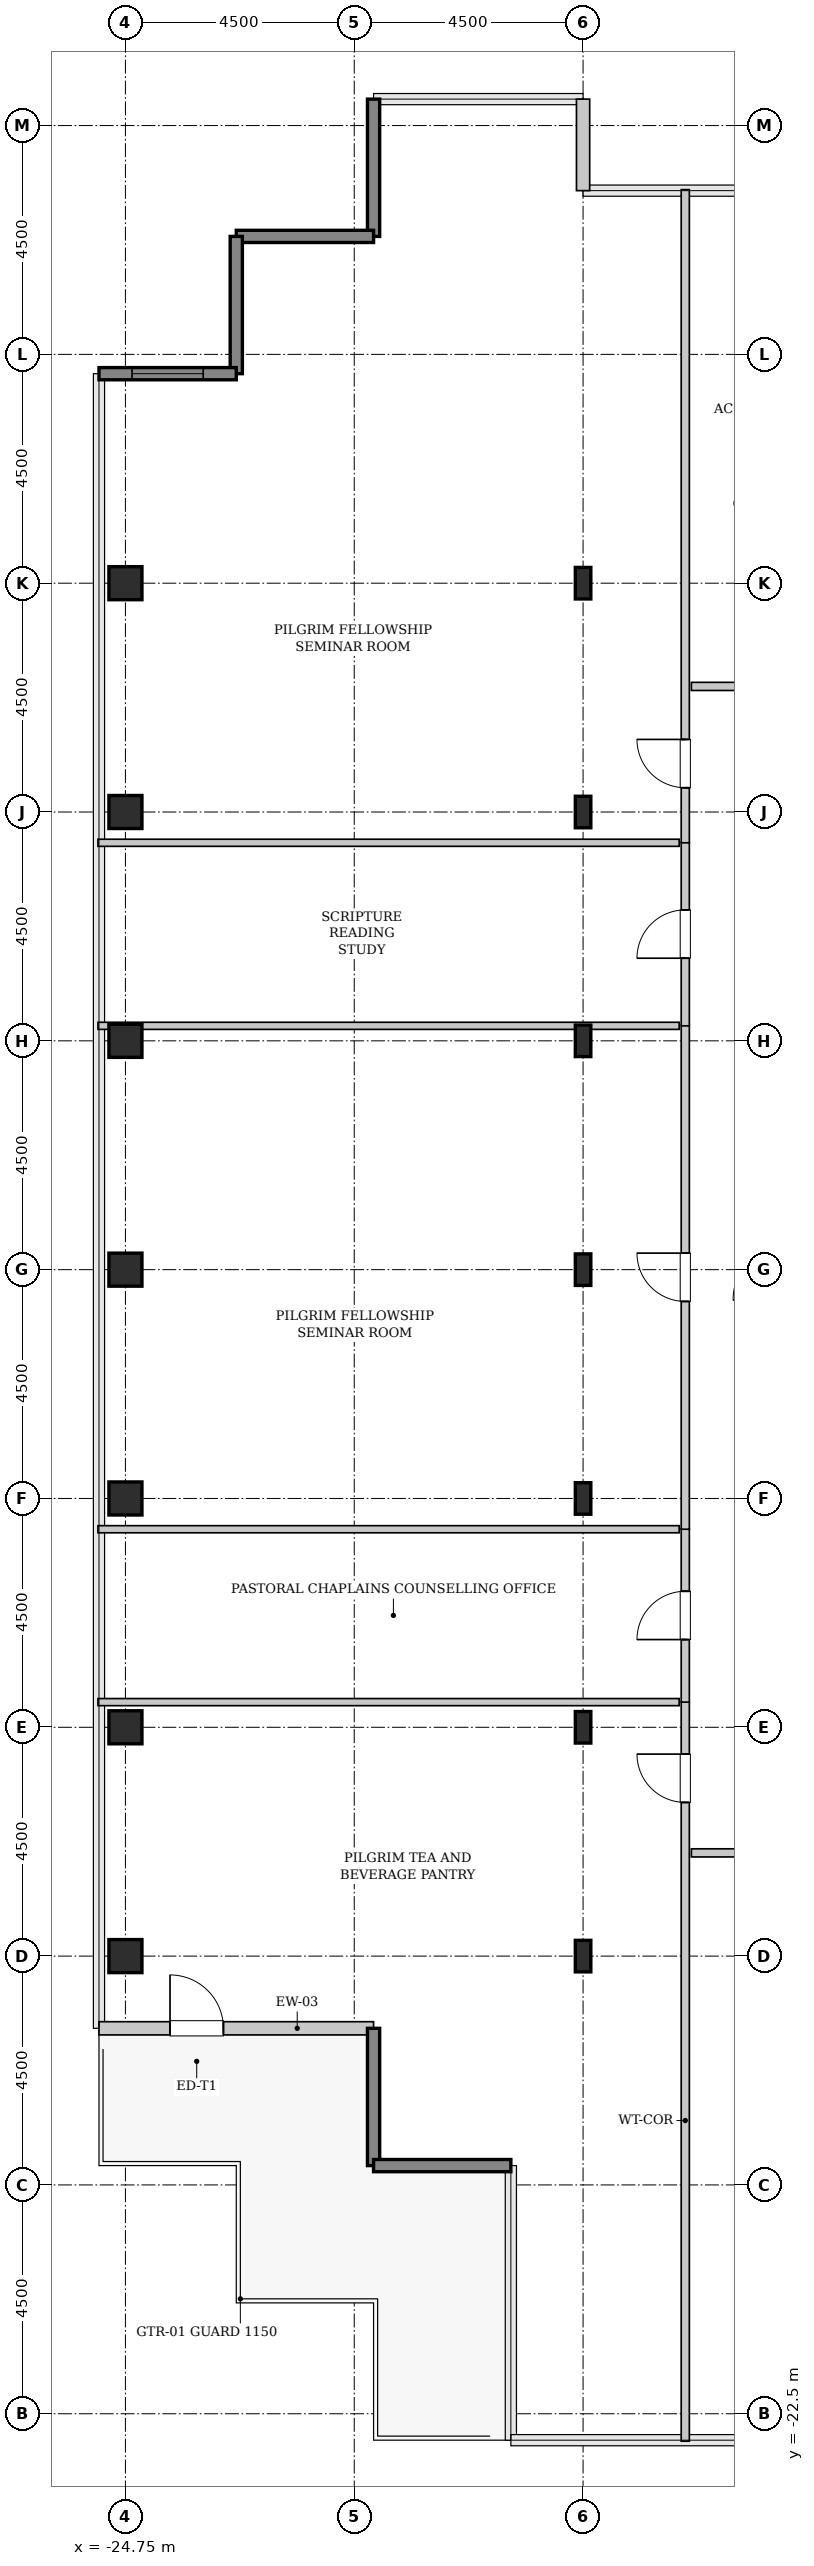
"""IFC4 building model, lengths in metres.
Left out: names, types, materials, properties, quantities, classifications, styles, units other than length and angle.
Written with IfcOpenShell. Run it as: python <this file> out.ifc"""

import sys

from ifc_helpers import new_model, si_unit, direction, frame, frame_2d, origin, origin_2d, place, context, subcontext, project, spatial, rectangle, hollow_rectangle, i_section, extrude, source, transform, mapped, element, fill, save


model = new_model("IFC4")
c1 = context("Model", 3, precision=1e-05, world=origin(), true_north=direction((0.0, 1.0)))
c2 = subcontext(c1, "Body", "Model", "MODEL_VIEW")
j1 = project(units=[si_unit("LENGTHUNIT", "METRE"), si_unit("PLANEANGLEUNIT", "RADIAN")], contexts=[c1])
p1 = place(None, origin())
s1 = spatial("IfcSite", under=j1, at=p1, CompositionType="ELEMENT")
p2 = place(p1, origin())
s2 = spatial("IfcBuilding", under=s1, at=p2, CompositionType="ELEMENT")
p3 = place(p2, frame((0.0, 0.0, 279.8)))
s3 = spatial("IfcBuildingStorey", under=s2, at=p3, CompositionType="ELEMENT", Elevation=279.8)
m1 = source(origin(), c2, "Body", "SweptSolid", [
    extrude(hollow_rectangle(XDim=0.65, YDim=0.65, WallThickness=0.032, InnerFilletRadius=0.032, OuterFilletRadius=0.064, at=origin_2d()), origin(), (0.0, 0.0, 1.0), 3.8),
])
for number, where, z_axis, x_axis in (
    (1, (-24.75, -13.5, 0.0), (0.0, 0.0, 1.0), (1.0, 0.0, 0.0)),
    (2, (-24.75, -9.0, 0.0), (0.0, 0.0, 1.0), (1.0, 0.0, 0.0)),
    (3, (-24.75, -4.5, 0.0), (0.0, 0.0, 1.0), (1.0, 0.0, 0.0)),
    (4, (-24.75, 0.0, 0.0), (0.0, 0.0, 1.0), (1.0, 0.0, 0.0)),
    (5, (-24.75, 4.5, 0.0), (0.0, 0.0, 1.0), (1.0, 0.0, 0.0)),
    (6, (-24.75, 9.0, 0.0), (0.0, 0.0, 1.0), (1.0, 0.0, 0.0)),
    (7, (-24.75, 13.5, 0.0), (0.0, 0.0, 1.0), (1.0, 0.0, 0.0)),
):
    element("IfcColumn", number, at=place(p3, frame(where, z_axis=z_axis, x_axis=x_axis)), inside=s3, PredefinedType="COLUMN", context=c2, shape_type="MappedRepresentation", body=[
        mapped(m1, transform((0.0, 0.0, 0.0), x_axis=(1.0, 0.0, 0.0), y_axis=(0.0, 1.0, 0.0), z_axis=(0.0, 0.0, 1.0), scale=1.0)),
    ])
m2 = source(origin(), c2, "Body", "SweptSolid", [
    extrude(i_section(OverallWidth=0.305, OverallDepth=0.62, WebThickness=0.021, FlangeThickness=0.04, FilletRadius=0.027, at=origin_2d()), origin(), (0.0, 0.0, 1.0), 3.8),
])
for number, where, z_axis, x_axis in (
    (8, (-15.75, -13.5, 0.0), (0.0, 0.0, 1.0), (1.0, 0.0, 0.0)),
    (9, (-15.75, -9.0, 0.0), (0.0, 0.0, 1.0), (1.0, 0.0, 0.0)),
    (10, (-15.75, -4.5, 0.0), (0.0, 0.0, 1.0), (1.0, 0.0, 0.0)),
    (11, (-15.75, 0.0, 0.0), (0.0, 0.0, 1.0), (1.0, 0.0, 0.0)),
    (12, (-15.75, 4.5, 0.0), (0.0, 0.0, 1.0), (1.0, 0.0, 0.0)),
    (13, (-15.75, 9.0, 0.0), (0.0, 0.0, 1.0), (1.0, 0.0, 0.0)),
    (14, (-15.75, 13.5, 0.0), (0.0, 0.0, 1.0), (1.0, 0.0, 0.0)),
):
    element("IfcColumn", number, at=place(p3, frame(where, z_axis=z_axis, x_axis=x_axis)), inside=s3, PredefinedType="COLUMN", context=c2, shape_type="MappedRepresentation", body=[
        mapped(m2, transform((0.0, 0.0, 0.0), x_axis=(1.0, 0.0, 0.0), y_axis=(0.0, 1.0, 0.0), z_axis=(0.0, 0.0, 1.0), scale=1.0)),
    ])
m3 = source(origin(), c2, "Body", "SweptSolid", [
    extrude(rectangle(XDim=1.8, YDim=0.26, at=frame_2d((0.9, 0.0))), origin(), (0.0, 0.0, 1.0), 3.55),
])
p4 = place(p3, frame((-15.75, 21.22, 0.0), z_axis=(0.0, 0.0, 1.0), x_axis=(0.0, 1.0, 0.0)))
e15 = element("IfcWall", 15, at=p4, inside=s3, PredefinedType="SOLIDWALL", context=c2, shape_type="MappedRepresentation", body=[
    mapped(m3, transform((0.0, 0.0, 0.0), x_axis=(1.0, 0.0, 0.0), y_axis=(0.0, 1.0, 0.0), z_axis=(0.0, 0.0, 1.0), scale=1.0)),
])
m4 = source(origin(), c2, "Body", "SweptSolid", [
    extrude(rectangle(XDim=2.7, YDim=0.24, at=frame_2d((1.35, 0.0))), origin(), (0.0, 0.0, 1.0), 3.55),
])
for number, where, z_axis, x_axis in (
    (16, (-19.87, 23.02, 0.0), (0.0, 0.0, 1.0), (0.0, -1.0, 0.0)),
    (17, (-19.87, 20.32, 0.0), (0.0, 0.0, 1.0), (-1.0, 0.0, 0.0)),
    (18, (-22.57, 20.32, 0.0), (0.0, 0.0, 1.0), (0.0, -1.0, 0.0)),
):
    element("IfcWall", number, at=place(p3, frame(where, z_axis=z_axis, x_axis=x_axis)), inside=s3, PredefinedType="SHEAR", context=c2, shape_type="MappedRepresentation", body=[
        mapped(m4, transform((0.0, 0.0, 0.0), x_axis=(1.0, 0.0, 0.0), y_axis=(0.0, 1.0, 0.0), z_axis=(0.0, 0.0, 1.0), scale=1.0)),
    ])
p5 = place(p3, frame((-22.57, 17.62, 0.0), z_axis=(0.0, 0.0, 1.0), x_axis=(-1.0, 0.0, 0.0)))
e19 = element("IfcWall", 19, at=p5, inside=s3, PredefinedType="SHEAR", context=c2, shape_type="MappedRepresentation", body=[
    mapped(m4, transform((0.0, 0.0, 0.0), x_axis=(1.0, 0.0, 0.0), y_axis=(0.0, 1.0, 0.0), z_axis=(0.0, 0.0, 1.0), scale=1.0)),
])
p6 = place(p5, frame((0.65, 0.0, 0.85)))
e20 = element("IfcOpeningElement", 20, at=p6, cuts=e19, PredefinedType="OPENING", context=c2, shape_type="SweptSolid", body=[
    extrude(rectangle(XDim=1.4, YDim=1.8, at=frame_2d((0.7, 0.9))), frame((0.0, 0.13, 0.0), z_axis=(0.0, -1.0, 0.0), x_axis=(1.0, 0.0, 0.0)), (0.0, 0.0, 1.0), 0.26),
])
m5 = source(origin(), c2, "Body", "SweptSolid", [
    extrude(rectangle(XDim=5.4, YDim=0.26, at=frame_2d((2.7, 0.0))), origin(), (0.0, 0.0, 1.0), 3.55),
])
p7 = place(p3, frame((-25.27, -14.92, 0.0), z_axis=(0.0, 0.0, 1.0), x_axis=(1.0, 0.0, 0.0)))
e21 = element("IfcWall", 21, at=p7, inside=s3, PredefinedType="SOLIDWALL", context=c2, shape_type="MappedRepresentation", body=[
    mapped(m5, transform((0.0, 0.0, 0.0), x_axis=(1.0, 0.0, 0.0), y_axis=(0.0, 1.0, 0.0), z_axis=(0.0, 0.0, 1.0), scale=1.0)),
])
p8 = place(p7, frame((1.397, 0.0, 0.0)))
e22 = element("IfcOpeningElement", 22, at=p8, cuts=e21, PredefinedType="OPENING", context=c2, shape_type="SweptSolid", body=[
    extrude(rectangle(XDim=1.05, YDim=2.2, at=frame_2d((0.525, 1.1))), frame((0.0, 0.14, 0.0), z_axis=(0.0, -1.0, 0.0), x_axis=(1.0, 0.0, 0.0)), (0.0, 0.0, 1.0), 0.28),
])
m6 = source(origin(), c2, "Body", "SweptSolid", [
    extrude(rectangle(XDim=2.7, YDim=0.24, at=frame_2d((1.35, 0.0))), origin(), (0.0, 0.0, 1.0), 3.55),
])
for number, where, z_axis, x_axis in (
    (23, (-19.87, -14.92, 0.0), (0.0, 0.0, 1.0), (0.0, -1.0, 0.0)),
    (24, (-19.87, -17.62, 0.0), (0.0, 0.0, 1.0), (1.0, 0.0, 0.0)),
):
    element("IfcWall", number, at=place(p3, frame(where, z_axis=z_axis, x_axis=x_axis)), inside=s3, PredefinedType="SHEAR", context=c2, shape_type="MappedRepresentation", body=[
        mapped(m6, transform((0.0, 0.0, 0.0), x_axis=(1.0, 0.0, 0.0), y_axis=(0.0, 1.0, 0.0), z_axis=(0.0, 0.0, 1.0), scale=1.0)),
    ])
m7 = source(origin(), c2, "Body", "SweptSolid", [
    extrude(rectangle(XDim=14.545, YDim=0.16, at=frame_2d((7.272, 0.0))), origin(), (0.0, 0.0, 1.0), 3.535),
])
p9 = place(p3, frame((-13.74, -23.04, 0.0), z_axis=(0.0, 0.0, 1.0), x_axis=(0.0, 1.0, 0.0)))
e25 = element("IfcWall", 25, at=p9, inside=s3, PredefinedType="PARTITIONING", context=c2, shape_type="MappedRepresentation", body=[
    mapped(m7, transform((0.0, 0.0, 0.0), x_axis=(1.0, 0.0, 0.0), y_axis=(0.0, 1.0, 0.0), z_axis=(0.0, 0.0, 1.0), scale=1.0)),
])
p10 = place(p9, frame((12.562, 0.0, 0.0)))
e26 = element("IfcOpeningElement", 26, at=p10, cuts=e25, PredefinedType="OPENING", context=c2, shape_type="SweptSolid", body=[
    extrude(rectangle(XDim=0.95, YDim=2.1, at=frame_2d((0.475, 1.05))), frame((0.0, 0.09, 0.0), z_axis=(0.0, -1.0, 0.0), x_axis=(1.0, 0.0, 0.0)), (0.0, 0.0, 1.0), 0.18),
])
m8 = source(origin(), c2, "Body", "SweptSolid", [
    extrude(rectangle(XDim=11.43, YDim=0.14, at=frame_2d((5.715, 0.0))), origin(), (0.0, 0.0, 1.0), 2.925),
])
p11 = place(p3, frame((-25.29, -8.505, 0.0), z_axis=(0.0, 0.0, 1.0), x_axis=(1.0, 0.0, 0.0)))
e27 = element("IfcWall", 27, at=p11, inside=s3, PredefinedType="PARTITIONING", context=c2, shape_type="MappedRepresentation", body=[
    mapped(m8, transform((0.0, 0.0, 0.0), x_axis=(1.0, 0.0, 0.0), y_axis=(0.0, 1.0, 0.0), z_axis=(0.0, 0.0, 1.0), scale=1.0)),
])
m9 = source(origin(), c2, "Body", "SweptSolid", [
    extrude(rectangle(XDim=3.41, YDim=0.16, at=frame_2d((1.705, 0.0))), origin(), (0.0, 0.0, 1.0), 3.535),
])
p12 = place(p3, frame((-13.74, -8.505, 0.0), z_axis=(0.0, 0.0, 1.0), x_axis=(0.0, 1.0, 0.0)))
e28 = element("IfcWall", 28, at=p12, inside=s3, PredefinedType="PARTITIONING", context=c2, shape_type="MappedRepresentation", body=[
    mapped(m9, transform((0.0, 0.0, 0.0), x_axis=(1.0, 0.0, 0.0), y_axis=(0.0, 1.0, 0.0), z_axis=(0.0, 0.0, 1.0), scale=1.0)),
])
p13 = place(p12, frame((1.23, 0.0, 0.0)))
e29 = element("IfcOpeningElement", 29, at=p13, cuts=e28, PredefinedType="OPENING", context=c2, shape_type="SweptSolid", body=[
    extrude(rectangle(XDim=0.95, YDim=2.1, at=frame_2d((0.475, 1.05))), frame((0.0, 0.09, 0.0), z_axis=(0.0, -1.0, 0.0), x_axis=(1.0, 0.0, 0.0)), (0.0, 0.0, 1.0), 0.18),
])
m10 = source(origin(), c2, "Body", "SweptSolid", [
    extrude(rectangle(XDim=11.43, YDim=0.14, at=frame_2d((5.715, 0.0))), origin(), (0.0, 0.0, 1.0), 3.535),
])
p14 = place(p3, frame((-25.29, -5.105, 0.0), z_axis=(0.0, 0.0, 1.0), x_axis=(1.0, 0.0, 0.0)))
e30 = element("IfcWall", 30, at=p14, inside=s3, PredefinedType="PARTITIONING", context=c2, shape_type="MappedRepresentation", body=[
    mapped(m10, transform((0.0, 0.0, 0.0), x_axis=(1.0, 0.0, 0.0), y_axis=(0.0, 1.0, 0.0), z_axis=(0.0, 0.0, 1.0), scale=1.0)),
])
m11 = source(origin(), c2, "Body", "SweptSolid", [
    extrude(rectangle(XDim=9.91, YDim=0.16, at=frame_2d((4.955, 0.0))), origin(), (0.0, 0.0, 1.0), 3.535),
])
p15 = place(p3, frame((-13.74, -5.105, 0.0), z_axis=(0.0, 0.0, 1.0), x_axis=(0.0, 1.0, 0.0)))
e31 = element("IfcWall", 31, at=p15, inside=s3, PredefinedType="PARTITIONING", context=c2, shape_type="MappedRepresentation", body=[
    mapped(m11, transform((0.0, 0.0, 0.0), x_axis=(1.0, 0.0, 0.0), y_axis=(0.0, 1.0, 0.0), z_axis=(0.0, 0.0, 1.0), scale=1.0)),
])
p16 = place(p15, frame((4.48, 0.0, 0.0)))
e32 = element("IfcOpeningElement", 32, at=p16, cuts=e31, PredefinedType="OPENING", context=c2, shape_type="SweptSolid", body=[
    extrude(rectangle(XDim=0.95, YDim=2.1, at=frame_2d((0.475, 1.05))), frame((0.0, 0.09, 0.0), z_axis=(0.0, -1.0, 0.0), x_axis=(1.0, 0.0, 0.0)), (0.0, 0.0, 1.0), 0.18),
])
p17 = place(p3, frame((-25.29, 4.795, 0.0), z_axis=(0.0, 0.0, 1.0), x_axis=(1.0, 0.0, 0.0)))
e33 = element("IfcWall", 33, at=p17, inside=s3, PredefinedType="PARTITIONING", context=c2, shape_type="MappedRepresentation", body=[
    mapped(m8, transform((0.0, 0.0, 0.0), x_axis=(1.0, 0.0, 0.0), y_axis=(0.0, 1.0, 0.0), z_axis=(0.0, 0.0, 1.0), scale=1.0)),
])
m12 = source(origin(), c2, "Body", "SweptSolid", [
    extrude(rectangle(XDim=3.61, YDim=0.16, at=frame_2d((1.805, 0.0))), origin(), (0.0, 0.0, 1.0), 3.535),
])
p18 = place(p3, frame((-13.74, 4.795, 0.0), z_axis=(0.0, 0.0, 1.0), x_axis=(0.0, 1.0, 0.0)))
e34 = element("IfcWall", 34, at=p18, inside=s3, PredefinedType="PARTITIONING", context=c2, shape_type="MappedRepresentation", body=[
    mapped(m12, transform((0.0, 0.0, 0.0), x_axis=(1.0, 0.0, 0.0), y_axis=(0.0, 1.0, 0.0), z_axis=(0.0, 0.0, 1.0), scale=1.0)),
])
p19 = place(p18, frame((1.33, 0.0, 0.0)))
e35 = element("IfcOpeningElement", 35, at=p19, cuts=e34, PredefinedType="OPENING", context=c2, shape_type="SweptSolid", body=[
    extrude(rectangle(XDim=0.95, YDim=2.1, at=frame_2d((0.475, 1.05))), frame((0.0, 0.09, 0.0), z_axis=(0.0, -1.0, 0.0), x_axis=(1.0, 0.0, 0.0)), (0.0, 0.0, 1.0), 0.18),
])
p20 = place(p3, frame((-25.29, 8.395, 0.0), z_axis=(0.0, 0.0, 1.0), x_axis=(1.0, 0.0, 0.0)))
e36 = element("IfcWall", 36, at=p20, inside=s3, PredefinedType="PARTITIONING", context=c2, shape_type="MappedRepresentation", body=[
    mapped(m10, transform((0.0, 0.0, 0.0), x_axis=(1.0, 0.0, 0.0), y_axis=(0.0, 1.0, 0.0), z_axis=(0.0, 0.0, 1.0), scale=1.0)),
])
m13 = source(origin(), c2, "Body", "SweptSolid", [
    extrude(rectangle(XDim=12.845, YDim=0.16, at=frame_2d((6.422, 0.0))), origin(), (0.0, 0.0, 1.0), 3.535),
])
p21 = place(p3, frame((-13.74, 8.395, 0.0), z_axis=(0.0, 0.0, 1.0), x_axis=(0.0, 1.0, 0.0)))
e37 = element("IfcWall", 37, at=p21, inside=s3, PredefinedType="PARTITIONING", context=c2, shape_type="MappedRepresentation", body=[
    mapped(m13, transform((0.0, 0.0, 0.0), x_axis=(1.0, 0.0, 0.0), y_axis=(0.0, 1.0, 0.0), z_axis=(0.0, 0.0, 1.0), scale=1.0)),
])
p22 = place(p21, frame((1.083, 0.0, 0.0)))
e38 = element("IfcOpeningElement", 38, at=p22, cuts=e37, PredefinedType="OPENING", context=c2, shape_type="SweptSolid", body=[
    extrude(rectangle(XDim=0.95, YDim=2.1, at=frame_2d((0.475, 1.05))), frame((0.0, 0.09, 0.0), z_axis=(0.0, -1.0, 0.0), x_axis=(1.0, 0.0, 0.0)), (0.0, 0.0, 1.0), 0.18),
])
m14 = source(origin(), c2, "Body", "SweptSolid", [
    extrude(rectangle(XDim=4.125, YDim=0.16, at=frame_2d((2.062, 0.0))), origin(), (0.0, 0.0, 1.0), 3.535),
])
p23 = place(p3, frame((-13.62, 11.47, 0.0), z_axis=(0.0, 0.0, 1.0), x_axis=(1.0, 0.0, 0.0)))
e39 = element("IfcWall", 39, at=p23, inside=s3, PredefinedType="PARTITIONING", context=c2, shape_type="MappedRepresentation", body=[
    mapped(m14, transform((0.0, 0.0, 0.0), x_axis=(1.0, 0.0, 0.0), y_axis=(0.0, 1.0, 0.0), z_axis=(0.0, 0.0, 1.0), scale=1.0)),
])
p24 = place(p23, frame((1.587, 0.0, 0.0)))
e40 = element("IfcOpeningElement", 40, at=p24, cuts=e39, PredefinedType="OPENING", context=c2, shape_type="SweptSolid", body=[
    extrude(rectangle(XDim=0.95, YDim=2.1, at=frame_2d((0.475, 1.05))), frame((0.0, 0.09, 0.0), z_axis=(0.0, -1.0, 0.0), x_axis=(1.0, 0.0, 0.0)), (0.0, 0.0, 1.0), 0.18),
])
m15 = source(origin(), c2, "Body", "SweptSolid", [
    extrude(rectangle(XDim=5.025, YDim=0.16, at=frame_2d((2.513, 0.0))), origin(), (0.0, 0.0, 1.0), 3.535),
])
p25 = place(p3, frame((-13.62, -11.47, 0.0), z_axis=(0.0, 0.0, 1.0), x_axis=(1.0, 0.0, 0.0)))
e41 = element("IfcWall", 41, at=p25, inside=s3, PredefinedType="PARTITIONING", context=c2, shape_type="MappedRepresentation", body=[
    mapped(m15, transform((0.0, 0.0, 0.0), x_axis=(1.0, 0.0, 0.0), y_axis=(0.0, 1.0, 0.0), z_axis=(0.0, 0.0, 1.0), scale=1.0)),
])
p26 = place(p25, frame((2.038, 0.0, 0.0)))
e42 = element("IfcOpeningElement", 42, at=p26, cuts=e41, PredefinedType="OPENING", context=c2, shape_type="SweptSolid", body=[
    extrude(rectangle(XDim=0.95, YDim=2.1, at=frame_2d((0.475, 1.05))), frame((0.0, 0.09, 0.0), z_axis=(0.0, -1.0, 0.0), x_axis=(1.0, 0.0, 0.0)), (0.0, 0.0, 1.0), 0.18),
])
m16 = source(origin(), c2, "Body", "SweptSolid", [
    extrude(rectangle(XDim=1.4, YDim=1.8, at=frame_2d((0.7, 0.9))), frame((0.0, 0.03, 0.0), z_axis=(0.0, -1.0, 0.0), x_axis=(1.0, 0.0, 0.0)), (0.0, 0.0, 1.0), 0.06),
])
p27 = place(p6, origin())
e43 = element("IfcWindow", 43, at=p27, inside=s3, PartitioningType="SINGLE_PANEL", PredefinedType="WINDOW", context=c2, shape_type="MappedRepresentation", body=[
    mapped(m16, transform((0.0, 0.0, 0.0), x_axis=(1.0, 0.0, 0.0), y_axis=(0.0, 1.0, 0.0), z_axis=(0.0, 0.0, 1.0), scale=1.0)),
])
fill(e20, e43)
m17 = source(origin(), c2, "Body", "SweptSolid", [
    extrude(rectangle(XDim=1.05, YDim=2.2, at=frame_2d((0.525, 1.1))), frame((0.0, 0.025, 0.0), z_axis=(0.0, -1.0, 0.0), x_axis=(1.0, 0.0, 0.0)), (0.0, 0.0, 1.0), 0.05),
])
p28 = place(p8, origin())
e44 = element("IfcDoor", 44, at=p28, inside=s3, OperationType="SINGLE_SWING_LEFT", PredefinedType="DOOR", context=c2, shape_type="MappedRepresentation", body=[
    mapped(m17, transform((0.0, 0.0, 0.0), x_axis=(1.0, 0.0, 0.0), y_axis=(0.0, 1.0, 0.0), z_axis=(0.0, 0.0, 1.0), scale=1.0)),
])
fill(e22, e44)
m18 = source(origin(), c2, "Body", "SweptSolid", [
    extrude(rectangle(XDim=0.95, YDim=2.1, at=frame_2d((0.475, 1.05))), frame((0.0, 0.025, 0.0), z_axis=(0.0, -1.0, 0.0), x_axis=(1.0, 0.0, 0.0)), (0.0, 0.0, 1.0), 0.05),
])
p29 = place(p10, origin())
e45 = element("IfcDoor", 45, at=p29, inside=s3, OperationType="SINGLE_SWING_RIGHT", PredefinedType="DOOR", context=c2, shape_type="MappedRepresentation", body=[
    mapped(m18, transform((0.0, 0.0, 0.0), x_axis=(1.0, 0.0, 0.0), y_axis=(0.0, 1.0, 0.0), z_axis=(0.0, 0.0, 1.0), scale=1.0)),
])
fill(e26, e45)
p30 = place(p13, origin())
e46 = element("IfcDoor", 46, at=p30, inside=s3, OperationType="SINGLE_SWING_LEFT", PredefinedType="DOOR", context=c2, shape_type="MappedRepresentation", body=[
    mapped(m18, transform((0.0, 0.0, 0.0), x_axis=(1.0, 0.0, 0.0), y_axis=(0.0, 1.0, 0.0), z_axis=(0.0, 0.0, 1.0), scale=1.0)),
])
fill(e29, e46)
p31 = place(p16, origin())
e47 = element("IfcDoor", 47, at=p31, inside=s3, OperationType="SINGLE_SWING_RIGHT", PredefinedType="DOOR", context=c2, shape_type="MappedRepresentation", body=[
    mapped(m18, transform((0.0, 0.0, 0.0), x_axis=(1.0, 0.0, 0.0), y_axis=(0.0, 1.0, 0.0), z_axis=(0.0, 0.0, 1.0), scale=1.0)),
])
fill(e32, e47)
p32 = place(p19, origin())
e48 = element("IfcDoor", 48, at=p32, inside=s3, OperationType="SINGLE_SWING_LEFT", PredefinedType="DOOR", context=c2, shape_type="MappedRepresentation", body=[
    mapped(m18, transform((0.0, 0.0, 0.0), x_axis=(1.0, 0.0, 0.0), y_axis=(0.0, 1.0, 0.0), z_axis=(0.0, 0.0, 1.0), scale=1.0)),
])
fill(e35, e48)
p33 = place(p22, origin())
e49 = element("IfcDoor", 49, at=p33, inside=s3, OperationType="SINGLE_SWING_RIGHT", PredefinedType="DOOR", context=c2, shape_type="MappedRepresentation", body=[
    mapped(m18, transform((0.0, 0.0, 0.0), x_axis=(1.0, 0.0, 0.0), y_axis=(0.0, 1.0, 0.0), z_axis=(0.0, 0.0, 1.0), scale=1.0)),
])
fill(e38, e49)
save(model, sys.argv[1])
